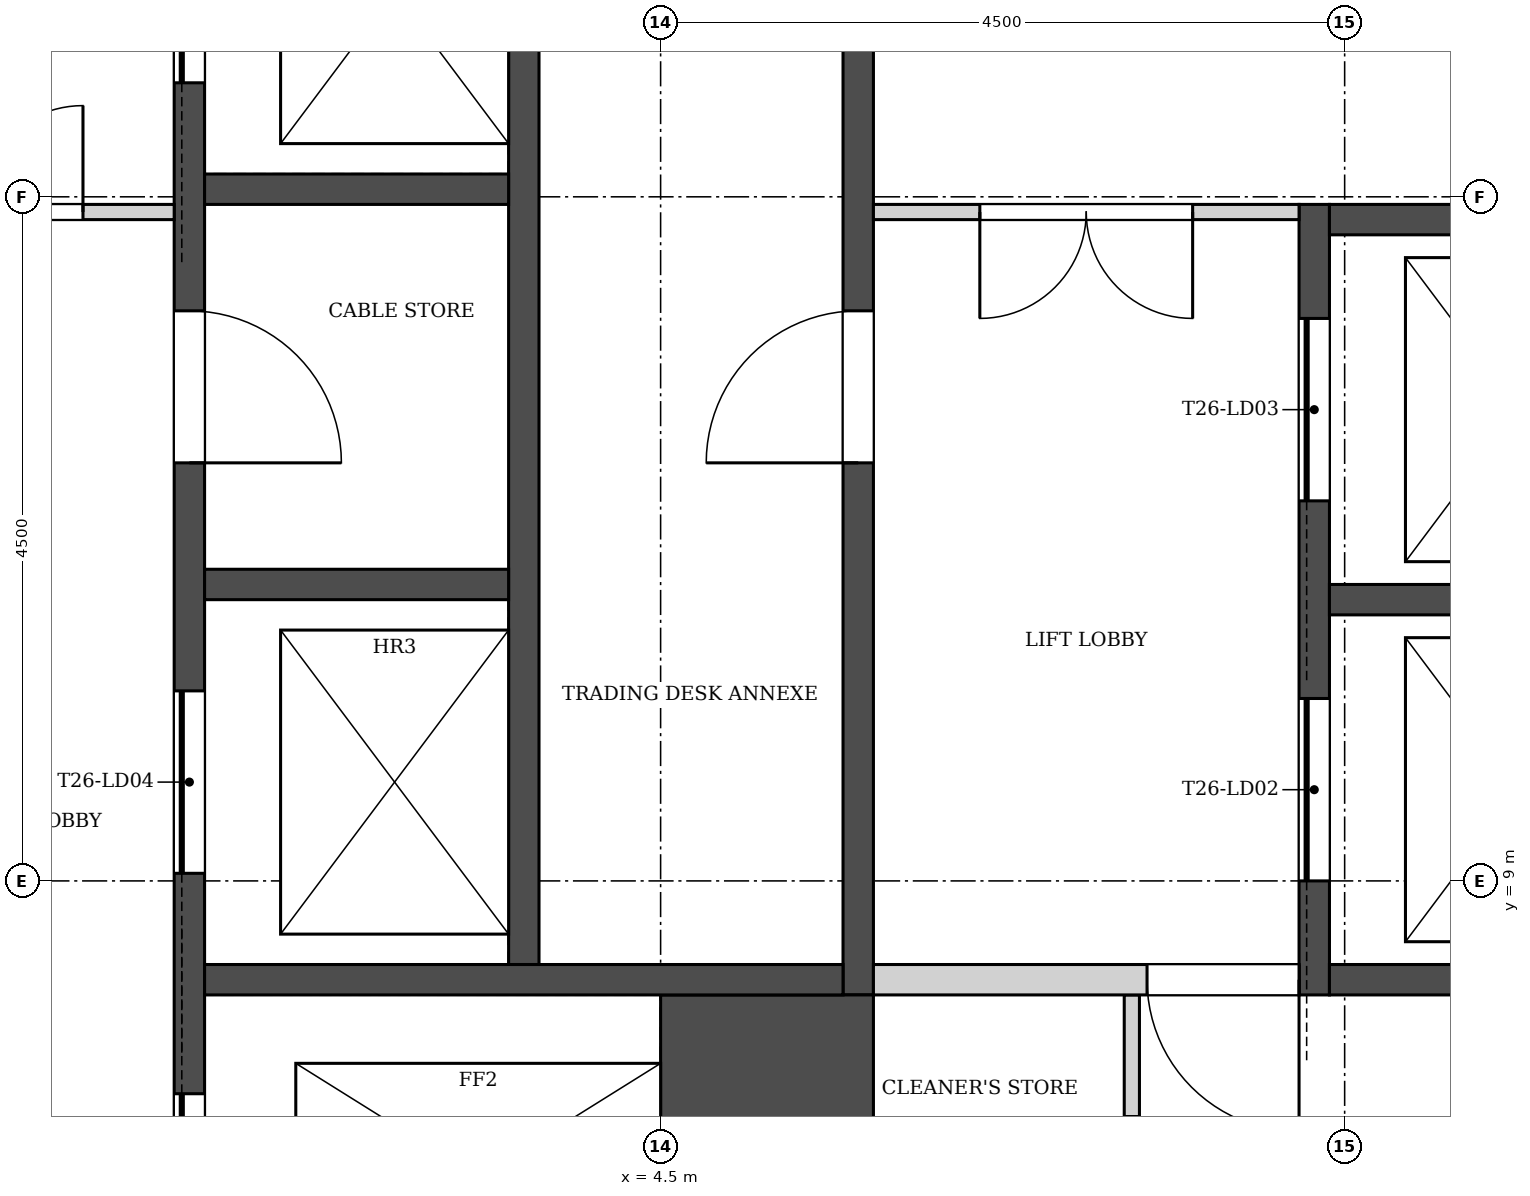
"""IFC4 building model, lengths in metres.
Left out: names, types, materials, properties, quantities, classifications, styles, units other than length and angle.
Written with IfcOpenShell. Run it as: python <this file> out.ifc"""

import sys

from ifc_helpers import new_model, si_unit, direction, frame, frame_2d, origin, place, context, subcontext, project, spatial, rectangle, extrude, element, fill, save


model = new_model("IFC4")
c1 = context("Model", 3, precision=1e-05, world=origin(), true_north=direction((0.0, 1.0)))
c2 = subcontext(c1, "Body", "Model", "MODEL_VIEW")
j1 = project(units=[si_unit("LENGTHUNIT", "METRE"), si_unit("PLANEANGLEUNIT", "RADIAN")], contexts=[c1])
p1 = place(None, origin())
s1 = spatial("IfcSite", under=j1, at=p1, CompositionType="ELEMENT")
p2 = place(p1, origin())
s2 = spatial("IfcBuilding", under=s1, at=p2, CompositionType="ELEMENT")
p3 = place(p2, frame((0.0, 0.0, 344.7)))
s3 = spatial("IfcBuildingStorey", under=s2, at=p3, CompositionType="ELEMENT", Elevation=344.7)
p4 = place(p3, frame((13.054, 10.692, 0.0), z_axis=(0.0, 0.0, 1.0), x_axis=(-0.500015780397, 0.866016292776, 0.0)))
e1 = element("IfcWall", 1, at=p4, inside=s3, PredefinedType="SHEAR", context=c2, shape_type="SweptSolid", body=[
    extrude(rectangle(XDim=8.67, YDim=0.8, at=frame_2d((4.335, 0.0))), origin(), (0.0, 0.0, 1.0), 4.8),
])
p5 = place(p3, frame((8.8, 8.25, -0.8), z_axis=(0.0, 0.0, 1.0), x_axis=(0.0, 1.0, 0.0)))
e2 = element("IfcWall", 2, at=p5, inside=s3, PredefinedType="SOLIDWALL", context=c2, shape_type="SweptSolid", body=[
    extrude(rectangle(XDim=5.2, YDim=0.2, at=frame_2d((2.6, 0.0))), origin(), (0.0, 0.0, 1.0), 5.6),
])
p6 = place(p5, frame((0.75, 0.0, 0.8)))
e3 = element("IfcOpeningElement", 3, at=p6, cuts=e2, PredefinedType="OPENING", context=c2, shape_type="SweptSolid", body=[
    extrude(rectangle(XDim=1.2, YDim=2.1, at=frame_2d((0.6, 1.05))), frame((0.0, 0.11, 0.0), z_axis=(0.0, -1.0, 0.0), x_axis=(1.0, 0.0, 0.0)), (0.0, 0.0, 1.0), 0.22),
])
p7 = place(p5, frame((3.25, 0.0, 0.8)))
e4 = element("IfcOpeningElement", 4, at=p7, cuts=e2, PredefinedType="OPENING", context=c2, shape_type="SweptSolid", body=[
    extrude(rectangle(XDim=1.2, YDim=2.1, at=frame_2d((0.6, 1.05))), frame((0.0, 0.11, 0.0), z_axis=(0.0, -1.0, 0.0), x_axis=(1.0, 0.0, 0.0)), (0.0, 0.0, 1.0), 0.22),
])
p8 = place(p3, frame((5.8, 8.25, -0.8), z_axis=(0.0, 0.0, 1.0), x_axis=(0.0, 1.0, 0.0)))
e5 = element("IfcWall", 5, at=p8, inside=s3, PredefinedType="SOLIDWALL", context=c2, shape_type="SweptSolid", body=[
    extrude(rectangle(XDim=8.0, YDim=0.2, at=frame_2d((4.0, 0.0))), origin(), (0.0, 0.0, 1.0), 5.6),
])
p9 = place(p8, frame((3.5, 0.0, 0.8)))
e6 = element("IfcOpeningElement", 6, at=p9, cuts=e5, PredefinedType="OPENING", context=c2, shape_type="SweptSolid", body=[
    extrude(rectangle(XDim=1.0, YDim=2.1, at=frame_2d((0.5, 1.05))), frame((0.0, 0.11, 0.0), z_axis=(0.0, -1.0, 0.0), x_axis=(1.0, 0.0, 0.0)), (0.0, 0.0, 1.0), 0.22),
])
p10 = place(p3, frame((3.6, 8.45, -0.8), z_axis=(0.0, 0.0, 1.0), x_axis=(0.0, 1.0, 0.0)))
e7 = element("IfcWall", 7, at=p10, inside=s3, PredefinedType="SOLIDWALL", context=c2, shape_type="SweptSolid", body=[
    extrude(rectangle(XDim=7.8, YDim=0.2, at=frame_2d((3.9, 0.0))), origin(), (0.0, 0.0, 1.0), 5.6),
])
p11 = place(p3, frame((1.4, 5.85, -0.8), z_axis=(0.0, 0.0, 1.0), x_axis=(0.0, 1.0, 0.0)))
e8 = element("IfcWall", 8, at=p11, inside=s3, PredefinedType="SOLIDWALL", context=c2, shape_type="SweptSolid", body=[
    extrude(rectangle(XDim=11.75, YDim=0.2, at=frame_2d((5.875, 0.0))), origin(), (0.0, 0.0, 1.0), 5.6),
])
p12 = place(p11, frame((3.2, 0.0, 0.8)))
e9 = element("IfcOpeningElement", 9, at=p12, cuts=e8, PredefinedType="OPENING", context=c2, shape_type="SweptSolid", body=[
    extrude(rectangle(XDim=1.2, YDim=2.1, at=frame_2d((0.6, 1.05))), frame((0.0, 0.11, 0.0), z_axis=(0.0, -1.0, 0.0), x_axis=(1.0, 0.0, 0.0)), (0.0, 0.0, 1.0), 0.22),
])
p13 = place(p11, frame((8.4, 0.0, 0.8)))
e10 = element("IfcOpeningElement", 10, at=p13, cuts=e8, PredefinedType="OPENING", context=c2, shape_type="SweptSolid", body=[
    extrude(rectangle(XDim=1.2, YDim=2.1, at=frame_2d((0.6, 1.05))), frame((0.0, 0.11, 0.0), z_axis=(0.0, -1.0, 0.0), x_axis=(1.0, 0.0, 0.0)), (0.0, 0.0, 1.0), 0.22),
])
p14 = place(p11, frame((0.65, 0.0, 0.8)))
e11 = element("IfcOpeningElement", 11, at=p14, cuts=e8, PredefinedType="OPENING", context=c2, shape_type="SweptSolid", body=[
    extrude(rectangle(XDim=1.1, YDim=2.1, at=frame_2d((0.55, 1.05))), frame((0.0, 0.11, 0.0), z_axis=(0.0, -1.0, 0.0), x_axis=(1.0, 0.0, 0.0)), (0.0, 0.0, 1.0), 0.22),
])
p15 = place(p11, frame((5.9, 0.0, 0.8)))
e12 = element("IfcOpeningElement", 12, at=p15, cuts=e8, PredefinedType="OPENING", context=c2, shape_type="SweptSolid", body=[
    extrude(rectangle(XDim=1.0, YDim=2.1, at=frame_2d((0.5, 1.05))), frame((0.0, 0.11, 0.0), z_axis=(0.0, -1.0, 0.0), x_axis=(1.0, 0.0, 0.0)), (0.0, 0.0, 1.0), 0.22),
])
p16 = place(p3, frame((5.2, 5.85, -0.8), z_axis=(0.0, 0.0, 1.0), x_axis=(0.0, 1.0, 0.0)))
e13 = element("IfcWall", 13, at=p16, inside=s3, PredefinedType="SOLIDWALL", context=c2, shape_type="SweptSolid", body=[
    extrude(rectangle(XDim=2.4, YDim=1.4, at=frame_2d((1.2, 0.0))), origin(), (0.0, 0.0, 1.0), 5.6),
])
p17 = place(p3, frame((8.9, 8.35, -0.8), z_axis=(0.0, 0.0, 1.0), x_axis=(1.0, 0.0, 0.0)))
e14 = element("IfcWall", 14, at=p17, inside=s3, PredefinedType="SOLIDWALL", context=c2, shape_type="SweptSolid", body=[
    extrude(rectangle(XDim=2.0, YDim=0.2, at=frame_2d((1.0, 0.0))), origin(), (0.0, 0.0, 1.0), 5.6),
])
p18 = place(p3, frame((1.5, 8.35, -0.8), z_axis=(0.0, 0.0, 1.0), x_axis=(1.0, 0.0, 0.0)))
e15 = element("IfcWall", 15, at=p18, inside=s3, PredefinedType="SOLIDWALL", context=c2, shape_type="SweptSolid", body=[
    extrude(rectangle(XDim=4.2, YDim=0.2, at=frame_2d((2.1, 0.0))), origin(), (0.0, 0.0, 1.0), 5.6),
])
for number, where, z_axis, x_axis in (
    (16, (8.9, 10.85, -0.8), (0.0, 0.0, 1.0), (1.0, 0.0, 0.0)),
    (17, (8.9, 13.35, -0.8), (0.0, 0.0, 1.0), (1.0, 0.0, 0.0)),
    (18, (1.5, 10.95, -0.8), (0.0, 0.0, 1.0), (1.0, 0.0, 0.0)),
    (19, (1.5, 13.55, -0.8), (0.0, 0.0, 1.0), (1.0, 0.0, 0.0)),
):
    element("IfcWall", number, at=place(p3, frame(where, z_axis=z_axis, x_axis=x_axis)), inside=s3, PredefinedType="SOLIDWALL", context=c2, shape_type="SweptSolid", body=[
        extrude(rectangle(XDim=2.0, YDim=0.2, at=frame_2d((1.0, 0.0))), origin(), (0.0, 0.0, 1.0), 5.6),
    ])
p19 = place(p3, frame((5.9, 13.4, 0.0), z_axis=(0.0, 0.0, 1.0), x_axis=(1.0, 0.0, 0.0)))
e20 = element("IfcWall", 20, at=p19, inside=s3, PredefinedType="PARTITIONING", context=c2, shape_type="SweptSolid", body=[
    extrude(rectangle(XDim=2.8, YDim=0.1, at=frame_2d((1.4, 0.0))), origin(), (0.0, 0.0, 1.0), 4.8),
])
p20 = place(p19, frame((0.7, 0.0, 0.0)))
e21 = element("IfcOpeningElement", 21, at=p20, cuts=e20, PredefinedType="OPENING", context=c2, shape_type="SweptSolid", body=[
    extrude(rectangle(XDim=1.4, YDim=2.1, at=frame_2d((0.7, 1.05))), frame((0.0, 0.06, 0.0), z_axis=(0.0, -1.0, 0.0), x_axis=(1.0, 0.0, 0.0)), (0.0, 0.0, 1.0), 0.12),
])
p21 = place(p3, frame((7.6, 5.85, 0.0), z_axis=(0.0, 0.0, 1.0), x_axis=(0.0, 1.0, 0.0)))
e22 = element("IfcWall", 22, at=p21, inside=s3, PredefinedType="PARTITIONING", context=c2, shape_type="SweptSolid", body=[
    extrude(rectangle(XDim=2.4, YDim=0.1, at=frame_2d((1.2, 0.0))), origin(), (0.0, 0.0, 1.0), 4.8),
])
p22 = place(p21, frame((0.7, 0.0, 0.0)))
e23 = element("IfcOpeningElement", 23, at=p22, cuts=e22, PredefinedType="OPENING", context=c2, shape_type="SweptSolid", body=[
    extrude(rectangle(XDim=0.9, YDim=2.1, at=frame_2d((0.45, 1.05))), frame((0.0, 0.06, 0.0), z_axis=(0.0, -1.0, 0.0), x_axis=(1.0, 0.0, 0.0)), (0.0, 0.0, 1.0), 0.12),
])
p23 = place(p3, frame((5.9, 8.35, 0.0), z_axis=(0.0, 0.0, 1.0), x_axis=(1.0, 0.0, 0.0)))
e24 = element("IfcWall", 24, at=p23, inside=s3, PredefinedType="SOLIDWALL", context=c2, shape_type="SweptSolid", body=[
    extrude(rectangle(XDim=2.8, YDim=0.2, at=frame_2d((1.4, 0.0))), origin(), (0.0, 0.0, 1.0), 4.8),
])
p24 = place(p23, frame((1.8, 0.0, 0.0)))
e25 = element("IfcOpeningElement", 25, at=p24, cuts=e24, PredefinedType="OPENING", context=c2, shape_type="SweptSolid", body=[
    extrude(rectangle(XDim=1.0, YDim=2.1, at=frame_2d((0.5, 1.05))), frame((0.0, 0.11, 0.0), z_axis=(0.0, -1.0, 0.0), x_axis=(1.0, 0.0, 0.0)), (0.0, 0.0, 1.0), 0.22),
])
p25 = place(p3, frame((-1.3, 13.4, 0.0), z_axis=(0.0, 0.0, 1.0), x_axis=(1.0, 0.0, 0.0)))
e26 = element("IfcWall", 26, at=p25, inside=s3, PredefinedType="PARTITIONING", context=c2, shape_type="SweptSolid", body=[
    extrude(rectangle(XDim=2.6, YDim=0.1, at=frame_2d((1.3, 0.0))), origin(), (0.0, 0.0, 1.0), 4.8),
])
p26 = place(p25, frame((0.6, 0.0, 0.0)))
e27 = element("IfcOpeningElement", 27, at=p26, cuts=e26, PredefinedType="OPENING", context=c2, shape_type="SweptSolid", body=[
    extrude(rectangle(XDim=1.4, YDim=2.1, at=frame_2d((0.7, 1.05))), frame((0.0, 0.06, 0.0), z_axis=(0.0, -1.0, 0.0), x_axis=(1.0, 0.0, 0.0)), (0.0, 0.0, 1.0), 0.12),
])
p27 = place(p6, origin())
e28 = element("IfcDoor", 28, at=p27, inside=s3, OperationType="SLIDING_TO_LEFT", PredefinedType="DOOR", context=c2, shape_type="SweptSolid", body=[
    extrude(rectangle(XDim=1.2, YDim=2.1, at=frame_2d((0.6, 1.05))), frame((0.0, 0.025, 0.0), z_axis=(0.0, -1.0, 0.0), x_axis=(1.0, 0.0, 0.0)), (0.0, 0.0, 1.0), 0.05),
])
fill(e3, e28)
p28 = place(p7, origin())
e29 = element("IfcDoor", 29, at=p28, inside=s3, OperationType="SLIDING_TO_LEFT", PredefinedType="DOOR", context=c2, shape_type="SweptSolid", body=[
    extrude(rectangle(XDim=1.2, YDim=2.1, at=frame_2d((0.6, 1.05))), frame((0.0, 0.025, 0.0), z_axis=(0.0, -1.0, 0.0), x_axis=(1.0, 0.0, 0.0)), (0.0, 0.0, 1.0), 0.05),
])
fill(e4, e29)
p29 = place(p12, origin())
e30 = element("IfcDoor", 30, at=p29, inside=s3, OperationType="SLIDING_TO_LEFT", PredefinedType="DOOR", context=c2, shape_type="SweptSolid", body=[
    extrude(rectangle(XDim=1.2, YDim=2.1, at=frame_2d((0.6, 1.05))), frame((0.0, 0.025, 0.0), z_axis=(0.0, -1.0, 0.0), x_axis=(1.0, 0.0, 0.0)), (0.0, 0.0, 1.0), 0.05),
])
fill(e9, e30)
p30 = place(p13, origin())
e31 = element("IfcDoor", 31, at=p30, inside=s3, OperationType="SLIDING_TO_LEFT", PredefinedType="DOOR", context=c2, shape_type="SweptSolid", body=[
    extrude(rectangle(XDim=1.2, YDim=2.1, at=frame_2d((0.6, 1.05))), frame((0.0, 0.025, 0.0), z_axis=(0.0, -1.0, 0.0), x_axis=(1.0, 0.0, 0.0)), (0.0, 0.0, 1.0), 0.05),
])
fill(e10, e31)
p31 = place(p14, origin())
e32 = element("IfcDoor", 32, at=p31, inside=s3, OperationType="SLIDING_TO_RIGHT", PredefinedType="DOOR", context=c2, shape_type="SweptSolid", body=[
    extrude(rectangle(XDim=1.1, YDim=2.1, at=frame_2d((0.55, 1.05))), frame((0.0, 0.025, 0.0), z_axis=(0.0, -1.0, 0.0), x_axis=(1.0, 0.0, 0.0)), (0.0, 0.0, 1.0), 0.05),
])
fill(e11, e32)
p32 = place(p9, origin())
e33 = element("IfcDoor", 33, at=p32, inside=s3, OperationType="SINGLE_SWING_LEFT", PredefinedType="DOOR", context=c2, shape_type="SweptSolid", body=[
    extrude(rectangle(XDim=1.0, YDim=2.1, at=frame_2d((0.5, 1.05))), frame((0.0, 0.025, 0.0), z_axis=(0.0, -1.0, 0.0), x_axis=(1.0, 0.0, 0.0)), (0.0, 0.0, 1.0), 0.05),
])
fill(e6, e33)
p33 = place(p15, frame((1.0, 0.0, 0.0), z_axis=(0.0, 0.0, 1.0), x_axis=(-1.0, 0.0, 0.0)))
e34 = element("IfcDoor", 34, at=p33, inside=s3, OperationType="SINGLE_SWING_RIGHT", PredefinedType="DOOR", context=c2, shape_type="SweptSolid", body=[
    extrude(rectangle(XDim=1.0, YDim=2.1, at=frame_2d((0.5, 1.05))), frame((0.0, 0.025, 0.0), z_axis=(0.0, -1.0, 0.0), x_axis=(1.0, 0.0, 0.0)), (0.0, 0.0, 1.0), 0.05),
])
fill(e12, e34)
p34 = place(p20, frame((1.4, 0.0, 0.0), z_axis=(0.0, 0.0, 1.0), x_axis=(-1.0, 0.0, 0.0)))
e35 = element("IfcDoor", 35, at=p34, inside=s3, OperationType="DOUBLE_DOOR_SINGLE_SWING", PredefinedType="DOOR", context=c2, shape_type="SweptSolid", body=[
    extrude(rectangle(XDim=1.4, YDim=2.1, at=frame_2d((0.7, 1.05))), frame((0.0, 0.025, 0.0), z_axis=(0.0, -1.0, 0.0), x_axis=(1.0, 0.0, 0.0)), (0.0, 0.0, 1.0), 0.05),
])
fill(e21, e35)
p35 = place(p24, frame((1.0, 0.0, 0.0), z_axis=(0.0, 0.0, 1.0), x_axis=(-1.0, 0.0, 0.0)))
e36 = element("IfcDoor", 36, at=p35, inside=s3, OperationType="SINGLE_SWING_LEFT", PredefinedType="DOOR", context=c2, shape_type="SweptSolid", body=[
    extrude(rectangle(XDim=1.0, YDim=2.1, at=frame_2d((0.5, 1.05))), frame((0.0, 0.025, 0.0), z_axis=(0.0, -1.0, 0.0), x_axis=(1.0, 0.0, 0.0)), (0.0, 0.0, 1.0), 0.05),
])
fill(e25, e36)
p36 = place(p26, origin())
e37 = element("IfcDoor", 37, at=p36, inside=s3, OperationType="DOUBLE_DOOR_SINGLE_SWING", PredefinedType="DOOR", context=c2, shape_type="SweptSolid", body=[
    extrude(rectangle(XDim=1.4, YDim=2.1, at=frame_2d((0.7, 1.05))), frame((0.0, 0.025, 0.0), z_axis=(0.0, -1.0, 0.0), x_axis=(1.0, 0.0, 0.0)), (0.0, 0.0, 1.0), 0.05),
])
fill(e27, e37)
save(model, sys.argv[1])
